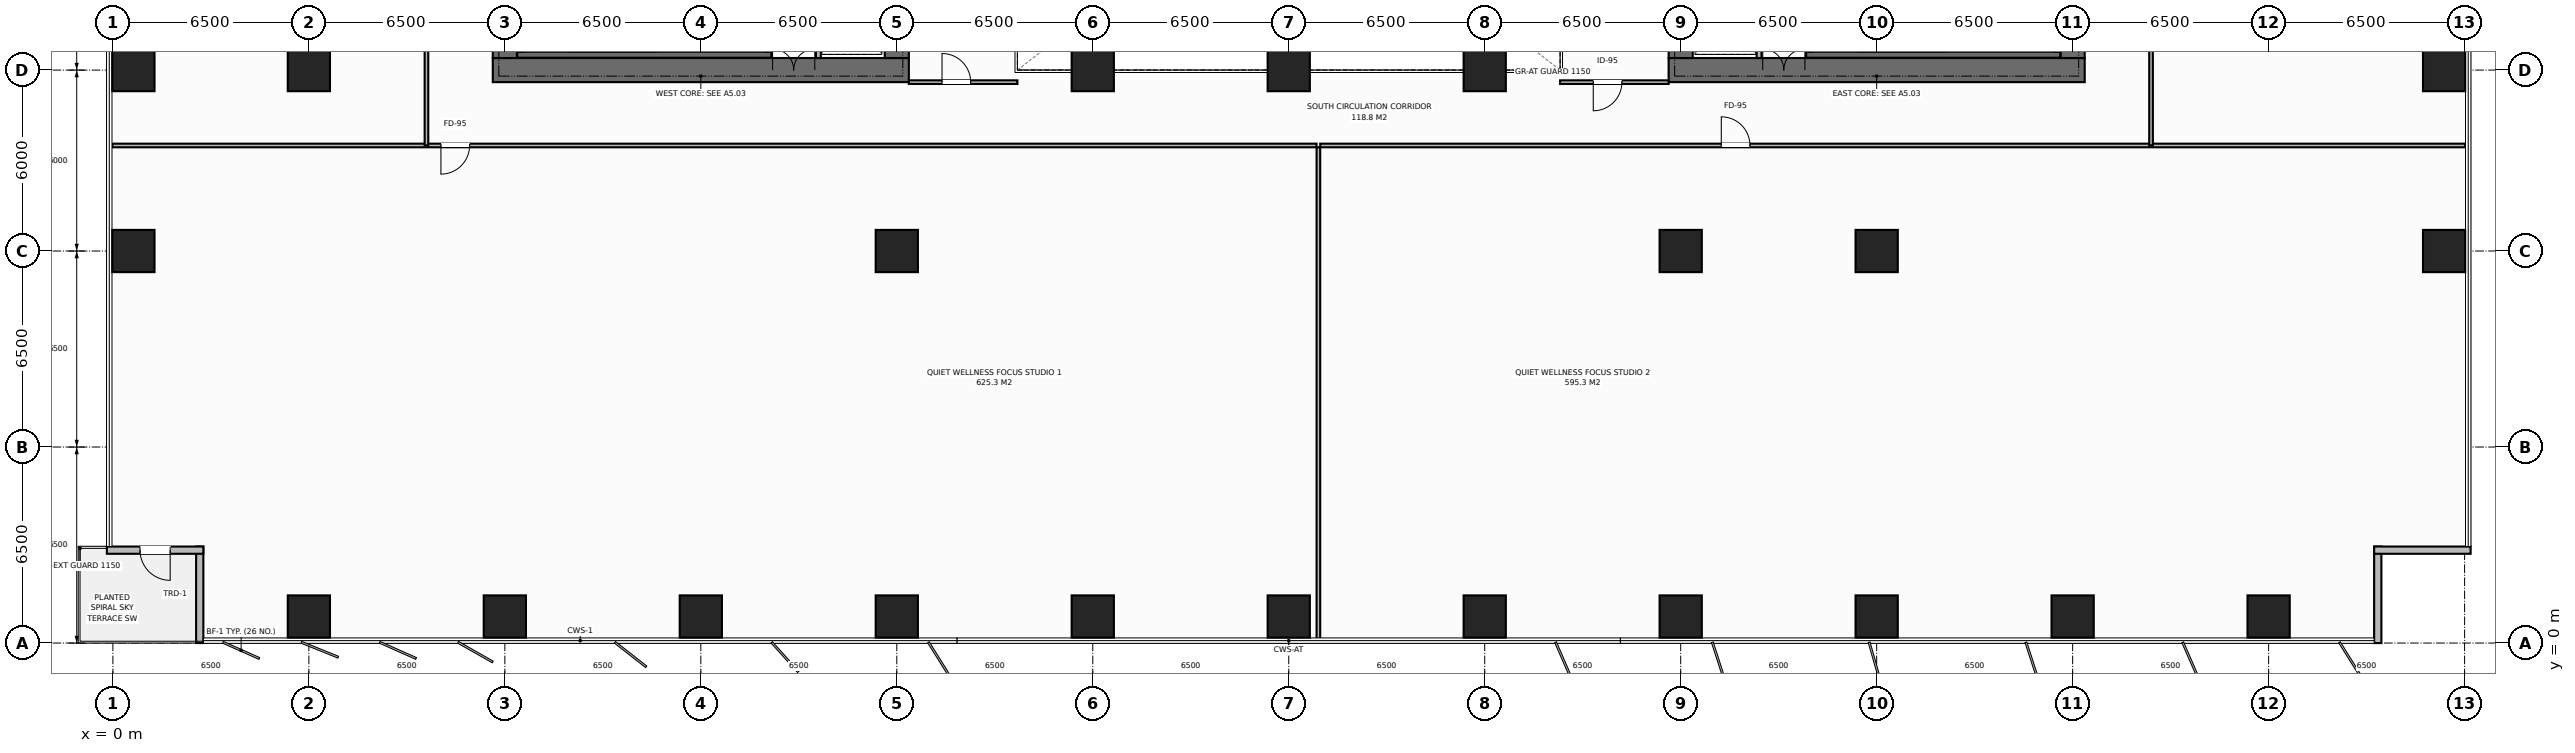
"""IFC4 building model, lengths in metres.
Left out: names, types, materials, properties, quantities, classifications, styles, units other than length and angle.
Written with IfcOpenShell. Run it as: python <this file> out.ifc"""

import sys

from ifc_helpers import new_model, si_unit, direction, frame, frame_2d, origin, origin_2d, place, context, subcontext, project, spatial, rectangle, extrude, element, fill, save


model = new_model("IFC4")
c1 = context("Model", 3, precision=1e-05, world=origin(), true_north=direction((0.0, 1.0)))
c2 = subcontext(c1, "Body", "Model", "MODEL_VIEW")
j1 = project(units=[si_unit("LENGTHUNIT", "METRE"), si_unit("PLANEANGLEUNIT", "RADIAN")], contexts=[c1])
p1 = place(None, origin())
s1 = spatial("IfcSite", under=j1, at=p1, CompositionType="ELEMENT")
p2 = place(p1, origin())
s2 = spatial("IfcBuilding", under=s1, at=p2, CompositionType="ELEMENT")
p3 = place(p2, frame((0.0, 0.0, 27.8)))
s3 = spatial("IfcBuildingStorey", under=s2, at=p3, CompositionType="ELEMENT", Elevation=27.8)
p4 = place(p3, frame((12.6, 19.0, 0.0), z_axis=(0.0, 0.0, 1.0), x_axis=(1.0, 0.0, 0.0)))
e1 = element("IfcWall", 1, at=p4, inside=s3, PredefinedType="SHEAR", context=c2, shape_type="SweptSolid", body=[
    extrude(rectangle(XDim=13.8, YDim=0.8, at=frame_2d((6.9, 0.0))), origin(), (0.0, 0.0, 1.0), 3.8),
])
p5 = place(p4, frame((9.28, 0.0, 0.0)))
e2 = element("IfcOpeningElement", 2, at=p5, cuts=e1, PredefinedType="OPENING", context=c2, shape_type="SweptSolid", body=[
    extrude(rectangle(XDim=1.4, YDim=2.2, at=frame_2d((0.7, 1.1))), frame((0.0, 0.41, 0.0), z_axis=(0.0, -1.0, 0.0), x_axis=(1.0, 0.0, 0.0)), (0.0, 0.0, 1.0), 0.82),
])
p6 = place(p3, frame((13.0, 19.4, 0.0), z_axis=(0.0, 0.0, 1.0), x_axis=(0.0, 1.0, 0.0)))
e3 = element("IfcWall", 3, at=p6, inside=s3, PredefinedType="SHEAR", context=c2, shape_type="SweptSolid", body=[
    extrude(rectangle(XDim=13.2, YDim=0.8, at=frame_2d((6.6, 0.0))), origin(), (0.0, 0.0, 1.0), 3.8),
])
p7 = place(p6, frame((4.65, 0.0, 0.0)))
e4 = element("IfcOpeningElement", 4, at=p7, cuts=e3, PredefinedType="OPENING", context=c2, shape_type="SweptSolid", body=[
    extrude(rectangle(XDim=1.4, YDim=2.2, at=frame_2d((0.7, 1.1))), frame((0.0, 0.41, 0.0), z_axis=(0.0, -1.0, 0.0), x_axis=(1.0, 0.0, 0.0)), (0.0, 0.0, 1.0), 0.82),
])
p8 = place(p3, frame((26.0, 19.4, 0.0), z_axis=(0.0, 0.0, 1.0), x_axis=(0.0, 1.0, 0.0)))
e5 = element("IfcWall", 5, at=p8, inside=s3, PredefinedType="SHEAR", context=c2, shape_type="SweptSolid", body=[
    extrude(rectangle(XDim=13.2, YDim=0.8, at=frame_2d((6.6, 0.0))), origin(), (0.0, 0.0, 1.0), 3.8),
])
p9 = place(p3, frame((51.6, 19.0, 0.0), z_axis=(0.0, 0.0, 1.0), x_axis=(1.0, 0.0, 0.0)))
e6 = element("IfcWall", 6, at=p9, inside=s3, PredefinedType="SHEAR", context=c2, shape_type="SweptSolid", body=[
    extrude(rectangle(XDim=13.8, YDim=0.8, at=frame_2d((6.9, 0.0))), origin(), (0.0, 0.0, 1.0), 3.8),
])
p10 = place(p9, frame((3.12, 0.0, 0.0)))
e7 = element("IfcOpeningElement", 7, at=p10, cuts=e6, PredefinedType="OPENING", context=c2, shape_type="SweptSolid", body=[
    extrude(rectangle(XDim=1.4, YDim=2.2, at=frame_2d((0.7, 1.1))), frame((0.0, 0.41, 0.0), z_axis=(0.0, -1.0, 0.0), x_axis=(1.0, 0.0, 0.0)), (0.0, 0.0, 1.0), 0.82),
])
p11 = place(p3, frame((52.0, 19.4, 0.0), z_axis=(0.0, 0.0, 1.0), x_axis=(0.0, 1.0, 0.0)))
e8 = element("IfcWall", 8, at=p11, inside=s3, PredefinedType="SHEAR", context=c2, shape_type="SweptSolid", body=[
    extrude(rectangle(XDim=13.2, YDim=0.8, at=frame_2d((6.6, 0.0))), origin(), (0.0, 0.0, 1.0), 3.8),
])
p12 = place(p3, frame((65.0, 19.4, 0.0), z_axis=(0.0, 0.0, 1.0), x_axis=(0.0, 1.0, 0.0)))
e9 = element("IfcWall", 9, at=p12, inside=s3, PredefinedType="SHEAR", context=c2, shape_type="SweptSolid", body=[
    extrude(rectangle(XDim=13.2, YDim=0.8, at=frame_2d((6.6, 0.0))), origin(), (0.0, 0.0, 1.0), 3.8),
])
p13 = place(p12, frame((8.05, 0.0, 0.0)))
e10 = element("IfcOpeningElement", 10, at=p13, cuts=e9, PredefinedType="OPENING", context=c2, shape_type="SweptSolid", body=[
    extrude(rectangle(XDim=1.3, YDim=2.2, at=frame_2d((0.65, 1.1))), frame((0.0, 0.41, 0.0), z_axis=(0.0, -1.0, 0.0), x_axis=(1.0, 0.0, 0.0)), (0.0, 0.0, 1.0), 0.82),
])
for number, where, z_axis, x_axis in (
    (11, (13.41, 19.51, 0.0), (0.0, 0.0, 1.0), (1.0, 0.0, 0.0)),
    (12, (56.16, 19.51, 0.0), (0.0, 0.0, 1.0), (1.0, 0.0, 0.0)),
):
    element("IfcWall", number, at=place(p3, frame(where, z_axis=z_axis, x_axis=x_axis)), inside=s3, PredefinedType="SHEAR", context=c2, shape_type="SweptSolid", body=[
        extrude(rectangle(XDim=8.43, YDim=0.2, at=frame_2d((4.215, 0.0))), origin(), (0.0, 0.0, 1.0), 3.8),
    ])
for number, where, z_axis, x_axis in (
    (13, (58.5, 13.0, 0.0), (0.0, 0.0, 1.0), (1.0, 0.0, 0.0)),
    (14, (6.5, 19.0, 0.0), (0.0, 0.0, 1.0), (1.0, 0.0, 0.0)),
    (15, (32.5, 19.0, 0.0), (0.0, 0.0, 1.0), (1.0, 0.0, 0.0)),
    (16, (39.0, 19.0, 0.0), (0.0, 0.0, 1.0), (1.0, 0.0, 0.0)),
    (17, (45.5, 19.0, 0.0), (0.0, 0.0, 1.0), (1.0, 0.0, 0.0)),
    (18, (26.0, 13.0, 0.0), (0.0, 0.0, 1.0), (1.0, 0.0, 0.0)),
    (19, (52.0, 13.0, 0.0), (0.0, 0.0, 1.0), (1.0, 0.0, 0.0)),
    (20, (6.5, 0.88, 0.0), (0.0, 0.0, 1.0), (1.0, 0.0, 0.0)),
    (21, (13.0, 0.88, 0.0), (0.0, 0.0, 1.0), (1.0, 0.0, 0.0)),
    (22, (19.5, 0.88, 0.0), (0.0, 0.0, 1.0), (1.0, 0.0, 0.0)),
    (23, (26.0, 0.88, 0.0), (0.0, 0.0, 1.0), (1.0, 0.0, 0.0)),
    (24, (32.5, 0.88, 0.0), (0.0, 0.0, 1.0), (1.0, 0.0, 0.0)),
    (25, (39.0, 0.88, 0.0), (0.0, 0.0, 1.0), (1.0, 0.0, 0.0)),
    (26, (45.5, 0.88, 0.0), (0.0, 0.0, 1.0), (1.0, 0.0, 0.0)),
    (27, (52.0, 0.88, 0.0), (0.0, 0.0, 1.0), (1.0, 0.0, 0.0)),
    (28, (58.5, 0.88, 0.0), (0.0, 0.0, 1.0), (1.0, 0.0, 0.0)),
    (29, (65.0, 0.88, 0.0), (0.0, 0.0, 1.0), (1.0, 0.0, 0.0)),
    (30, (71.5, 0.88, 0.0), (0.0, 0.0, 1.0), (1.0, 0.0, 0.0)),
    (31, (0.68, 13.0, 0.0), (0.0, 0.0, 1.0), (1.0, 0.0, 0.0)),
    (32, (77.32, 13.0, 0.0), (0.0, 0.0, 1.0), (1.0, 0.0, 0.0)),
    (33, (0.68, 19.0, 0.0), (0.0, 0.0, 1.0), (1.0, 0.0, 0.0)),
    (34, (77.32, 19.0, 0.0), (0.0, 0.0, 1.0), (1.0, 0.0, 0.0)),
):
    element("IfcColumn", number, at=place(p3, frame(where, z_axis=z_axis, x_axis=x_axis)), inside=s3, PredefinedType="COLUMN", context=c2, shape_type="SweptSolid", body=[
        extrude(rectangle(XDim=1.4, YDim=1.4, at=origin_2d()), origin(), (0.0, 0.0, 1.0), 3.8),
    ])
p14 = place(p3, frame((2.88, 0.0, 0.0), z_axis=(0.0, 0.0, 1.0), x_axis=(0.0, 1.0, 0.0)))
e35 = element("IfcWall", 35, at=p14, inside=s3, PredefinedType="STANDARD", context=c2, shape_type="SweptSolid", body=[
    extrude(rectangle(XDim=3.2, YDim=0.24, at=frame_2d((1.6, 0.0))), origin(), (0.0, 0.0, 1.0), 3.55),
])
p15 = place(p3, frame((3.0, 3.08, 0.0), z_axis=(0.0, 0.0, 1.0), x_axis=(-1.0, 0.0, 0.0)))
e36 = element("IfcWall", 36, at=p15, inside=s3, PredefinedType="STANDARD", context=c2, shape_type="SweptSolid", body=[
    extrude(rectangle(XDim=3.2, YDim=0.24, at=frame_2d((1.6, 0.0))), origin(), (0.0, 0.0, 1.0), 3.55),
])
p16 = place(p15, frame((1.1, 0.0, 0.0)))
e37 = element("IfcOpeningElement", 37, at=p16, cuts=e36, PredefinedType="OPENING", context=c2, shape_type="SweptSolid", body=[
    extrude(rectangle(XDim=1.0, YDim=2.2, at=frame_2d((0.5, 1.1))), frame((0.0, 0.13, 0.0), z_axis=(0.0, -1.0, 0.0), x_axis=(1.0, 0.0, 0.0)), (0.0, 0.0, 1.0), 0.26),
])
for number, where, z_axis, x_axis in (
    (38, (75.12, 3.2, 0.0), (0.0, 0.0, 1.0), (0.0, -1.0, 0.0)),
    (39, (78.2, 3.08, 0.0), (0.0, 0.0, 1.0), (-1.0, 0.0, 0.0)),
):
    element("IfcWall", number, at=place(p3, frame(where, z_axis=z_axis, x_axis=x_axis)), inside=s3, PredefinedType="STANDARD", context=c2, shape_type="SweptSolid", body=[
        extrude(rectangle(XDim=3.2, YDim=0.24, at=frame_2d((1.6, 0.0))), origin(), (0.0, 0.0, 1.0), 3.55),
    ])
p17 = place(p3, frame((23.4, 19.4, 0.0), z_axis=(0.0, 0.0, 1.0), x_axis=(0.0, 1.0, 0.0)))
e40 = element("IfcWall", 40, at=p17, inside=s3, PredefinedType="STANDARD", context=c2, shape_type="SweptSolid", body=[
    extrude(rectangle(XDim=13.2, YDim=0.16, at=frame_2d((6.6, 0.0))), origin(), (0.0, 0.0, 1.0), 3.55),
])
p18 = place(p17, frame((0.55, 0.0, 0.0)))
e41 = element("IfcOpeningElement", 41, at=p18, cuts=e40, PredefinedType="OPENING", context=c2, shape_type="SweptSolid", body=[
    extrude(rectangle(XDim=1.1, YDim=2.2, at=frame_2d((0.55, 1.1))), frame((0.0, 0.09, 0.0), z_axis=(0.0, -1.0, 0.0), x_axis=(1.0, 0.0, 0.0)), (0.0, 0.0, 1.0), 0.18),
])
p19 = place(p17, frame((2.7, 0.0, 0.0)))
e42 = element("IfcOpeningElement", 42, at=p19, cuts=e40, PredefinedType="OPENING", context=c2, shape_type="SweptSolid", body=[
    extrude(rectangle(XDim=1.1, YDim=2.2, at=frame_2d((0.55, 1.1))), frame((0.0, 0.09, 0.0), z_axis=(0.0, -1.0, 0.0), x_axis=(1.0, 0.0, 0.0)), (0.0, 0.0, 1.0), 0.18),
])
p20 = place(p3, frame((54.6, 19.4, 0.0), z_axis=(0.0, 0.0, 1.0), x_axis=(0.0, 1.0, 0.0)))
e43 = element("IfcWall", 43, at=p20, inside=s3, PredefinedType="STANDARD", context=c2, shape_type="SweptSolid", body=[
    extrude(rectangle(XDim=13.2, YDim=0.16, at=frame_2d((6.6, 0.0))), origin(), (0.0, 0.0, 1.0), 3.55),
])
p21 = place(p20, frame((0.55, 0.0, 0.0)))
e44 = element("IfcOpeningElement", 44, at=p21, cuts=e43, PredefinedType="OPENING", context=c2, shape_type="SweptSolid", body=[
    extrude(rectangle(XDim=1.1, YDim=2.2, at=frame_2d((0.55, 1.1))), frame((0.0, 0.09, 0.0), z_axis=(0.0, -1.0, 0.0), x_axis=(1.0, 0.0, 0.0)), (0.0, 0.0, 1.0), 0.18),
])
p22 = place(p20, frame((2.7, 0.0, 0.0)))
e45 = element("IfcOpeningElement", 45, at=p22, cuts=e43, PredefinedType="OPENING", context=c2, shape_type="SweptSolid", body=[
    extrude(rectangle(XDim=1.1, YDim=2.2, at=frame_2d((0.55, 1.1))), frame((0.0, 0.09, 0.0), z_axis=(0.0, -1.0, 0.0), x_axis=(1.0, 0.0, 0.0)), (0.0, 0.0, 1.0), 0.18),
])
p23 = place(p3, frame((26.4, 18.6, 0.0), z_axis=(0.0, 0.0, 1.0), x_axis=(1.0, 0.0, 0.0)))
e46 = element("IfcWall", 46, at=p23, inside=s3, PredefinedType="PARTITIONING", context=c2, shape_type="SweptSolid", body=[
    extrude(rectangle(XDim=3.6, YDim=0.12, at=frame_2d((1.8, 0.0))), origin(), (0.0, 0.0, 1.0), 3.55),
])
p24 = place(p23, frame((1.1, 0.0, 0.0)))
e47 = element("IfcOpeningElement", 47, at=p24, cuts=e46, PredefinedType="OPENING", context=c2, shape_type="SweptSolid", body=[
    extrude(rectangle(XDim=0.95, YDim=2.15, at=frame_2d((0.475, 1.075))), frame((0.0, 0.07, 0.0), z_axis=(0.0, -1.0, 0.0), x_axis=(1.0, 0.0, 0.0)), (0.0, 0.0, 1.0), 0.14),
])
p25 = place(p3, frame((48.0, 18.6, 0.0), z_axis=(0.0, 0.0, 1.0), x_axis=(1.0, 0.0, 0.0)))
e48 = element("IfcWall", 48, at=p25, inside=s3, PredefinedType="PARTITIONING", context=c2, shape_type="SweptSolid", body=[
    extrude(rectangle(XDim=3.6, YDim=0.12, at=frame_2d((1.8, 0.0))), origin(), (0.0, 0.0, 1.0), 3.55),
])
p26 = place(p25, frame((1.1, 0.0, 0.0)))
e49 = element("IfcOpeningElement", 49, at=p26, cuts=e48, PredefinedType="OPENING", context=c2, shape_type="SweptSolid", body=[
    extrude(rectangle(XDim=0.95, YDim=2.15, at=frame_2d((0.475, 1.075))), frame((0.0, 0.07, 0.0), z_axis=(0.0, -1.0, 0.0), x_axis=(1.0, 0.0, 0.0)), (0.0, 0.0, 1.0), 0.14),
])
p27 = place(p3, frame((39.983, 0.02, 0.0), z_axis=(0.0, 0.0, 1.0), x_axis=(0.0, 1.0, 0.0)))
e50 = element("IfcWall", 50, at=p27, inside=s3, PredefinedType="PARTITIONING", context=c2, shape_type="SweptSolid", body=[
    extrude(rectangle(XDim=16.42, YDim=0.12, at=frame_2d((8.21, 0.0))), origin(), (0.0, 0.0, 1.0), 3.55),
])
p28 = place(p3, frame((-0.02, 16.5, 0.0), z_axis=(0.0, 0.0, 1.0), x_axis=(1.0, 0.0, 0.0)))
e51 = element("IfcWall", 51, at=p28, inside=s3, PredefinedType="PARTITIONING", context=c2, shape_type="SweptSolid", body=[
    extrude(rectangle(XDim=39.943, YDim=0.12, at=frame_2d((19.972, 0.0))), origin(), (0.0, 0.0, 1.0), 3.55),
])
p29 = place(p28, frame((10.9, 0.0, 0.0)))
e52 = element("IfcOpeningElement", 52, at=p29, cuts=e51, PredefinedType="OPENING", context=c2, shape_type="SweptSolid", body=[
    extrude(rectangle(XDim=0.95, YDim=2.15, at=frame_2d((0.475, 1.075))), frame((0.0, 0.07, 0.0), z_axis=(0.0, -1.0, 0.0), x_axis=(1.0, 0.0, 0.0)), (0.0, 0.0, 1.0), 0.14),
])
p30 = place(p3, frame((40.043, 16.5, 0.0), z_axis=(0.0, 0.0, 1.0), x_axis=(1.0, 0.0, 0.0)))
e53 = element("IfcWall", 53, at=p30, inside=s3, PredefinedType="PARTITIONING", context=c2, shape_type="SweptSolid", body=[
    extrude(rectangle(XDim=37.977, YDim=0.12, at=frame_2d((18.988, 0.0))), origin(), (0.0, 0.0, 1.0), 3.55),
])
p31 = place(p30, frame((13.303, 0.0, 0.0)))
e54 = element("IfcOpeningElement", 54, at=p31, cuts=e53, PredefinedType="OPENING", context=c2, shape_type="SweptSolid", body=[
    extrude(rectangle(XDim=0.95, YDim=2.15, at=frame_2d((0.475, 1.075))), frame((0.0, 0.07, 0.0), z_axis=(0.0, -1.0, 0.0), x_axis=(1.0, 0.0, 0.0)), (0.0, 0.0, 1.0), 0.14),
])
p32 = place(p3, frame((10.4, 16.5, 0.0), z_axis=(0.0, 0.0, 1.0), x_axis=(0.0, 1.0, 0.0)))
e55 = element("IfcWall", 55, at=p32, inside=s3, PredefinedType="PARTITIONING", context=c2, shape_type="SweptSolid", body=[
    extrude(rectangle(XDim=19.0, YDim=0.12, at=frame_2d((9.5, 0.0))), origin(), (0.0, 0.0, 1.0), 3.55),
])
p33 = place(p32, frame((9.025, 0.0, 0.0)))
e56 = element("IfcOpeningElement", 56, at=p33, cuts=e55, PredefinedType="OPENING", context=c2, shape_type="SweptSolid", body=[
    extrude(rectangle(XDim=0.95, YDim=2.15, at=frame_2d((0.475, 1.075))), frame((0.0, 0.07, 0.0), z_axis=(0.0, -1.0, 0.0), x_axis=(1.0, 0.0, 0.0)), (0.0, 0.0, 1.0), 0.14),
])
p34 = place(p3, frame((67.6, 16.5, 0.0), z_axis=(0.0, 0.0, 1.0), x_axis=(0.0, 1.0, 0.0)))
e57 = element("IfcWall", 57, at=p34, inside=s3, PredefinedType="PARTITIONING", context=c2, shape_type="SweptSolid", body=[
    extrude(rectangle(XDim=9.5, YDim=0.12, at=frame_2d((4.75, 0.0))), origin(), (0.0, 0.0, 1.0), 3.55),
])
p35 = place(p34, frame((5.325, 0.0, 0.0)))
e58 = element("IfcOpeningElement", 58, at=p35, cuts=e57, PredefinedType="OPENING", context=c2, shape_type="SweptSolid", body=[
    extrude(rectangle(XDim=0.95, YDim=2.15, at=frame_2d((0.475, 1.075))), frame((0.0, 0.07, 0.0), z_axis=(0.0, -1.0, 0.0), x_axis=(1.0, 0.0, 0.0)), (0.0, 0.0, 1.0), 0.14),
])
p36 = place(p16, origin())
e59 = element("IfcDoor", 59, at=p36, inside=s3, OperationType="SINGLE_SWING_LEFT", PredefinedType="DOOR", context=c2, shape_type="SweptSolid", body=[
    extrude(rectangle(XDim=1.0, YDim=2.2, at=frame_2d((0.5, 1.1))), frame((0.0, 0.025, 0.0), z_axis=(0.0, -1.0, 0.0), x_axis=(1.0, 0.0, 0.0)), (0.0, 0.0, 1.0), 0.05),
])
fill(e37, e59)
p37 = place(p5, origin())
e60 = element("IfcDoor", 60, at=p37, inside=s3, OperationType="DOUBLE_DOOR_SINGLE_SWING", PredefinedType="DOOR", context=c2, shape_type="SweptSolid", body=[
    extrude(rectangle(XDim=1.4, YDim=2.2, at=frame_2d((0.7, 1.1))), frame((0.0, 0.125, 0.0), z_axis=(0.0, -1.0, 0.0), x_axis=(1.0, 0.0, 0.0)), (0.0, 0.0, 1.0), 0.05),
])
fill(e2, e60)
p38 = place(p10, origin())
e61 = element("IfcDoor", 61, at=p38, inside=s3, OperationType="DOUBLE_DOOR_SINGLE_SWING", PredefinedType="DOOR", context=c2, shape_type="SweptSolid", body=[
    extrude(rectangle(XDim=1.4, YDim=2.2, at=frame_2d((0.7, 1.1))), frame((0.0, 0.125, 0.0), z_axis=(0.0, -1.0, 0.0), x_axis=(1.0, 0.0, 0.0)), (0.0, 0.0, 1.0), 0.05),
])
fill(e7, e61)
p39 = place(p24, origin())
e62 = element("IfcDoor", 62, at=p39, inside=s3, OperationType="SINGLE_SWING_LEFT", PredefinedType="DOOR", context=c2, shape_type="SweptSolid", body=[
    extrude(rectangle(XDim=0.95, YDim=2.15, at=frame_2d((0.475, 1.075))), frame((0.0, 0.025, 0.0), z_axis=(0.0, -1.0, 0.0), x_axis=(1.0, 0.0, 0.0)), (0.0, 0.0, 1.0), 0.05),
])
fill(e47, e62)
p40 = place(p26, origin())
e63 = element("IfcDoor", 63, at=p40, inside=s3, OperationType="SINGLE_SWING_RIGHT", PredefinedType="DOOR", context=c2, shape_type="SweptSolid", body=[
    extrude(rectangle(XDim=0.95, YDim=2.15, at=frame_2d((0.475, 1.075))), frame((0.0, 0.025, 0.0), z_axis=(0.0, -1.0, 0.0), x_axis=(1.0, 0.0, 0.0)), (0.0, 0.0, 1.0), 0.05),
])
fill(e49, e63)
p41 = place(p29, origin())
e64 = element("IfcDoor", 64, at=p41, inside=s3, OperationType="SINGLE_SWING_RIGHT", PredefinedType="DOOR", context=c2, shape_type="SweptSolid", body=[
    extrude(rectangle(XDim=0.95, YDim=2.15, at=frame_2d((0.475, 1.075))), frame((0.0, 0.025, 0.0), z_axis=(0.0, -1.0, 0.0), x_axis=(1.0, 0.0, 0.0)), (0.0, 0.0, 1.0), 0.05),
])
fill(e52, e64)
p42 = place(p31, origin())
e65 = element("IfcDoor", 65, at=p42, inside=s3, OperationType="SINGLE_SWING_LEFT", PredefinedType="DOOR", context=c2, shape_type="SweptSolid", body=[
    extrude(rectangle(XDim=0.95, YDim=2.15, at=frame_2d((0.475, 1.075))), frame((0.0, 0.025, 0.0), z_axis=(0.0, -1.0, 0.0), x_axis=(1.0, 0.0, 0.0)), (0.0, 0.0, 1.0), 0.05),
])
fill(e54, e65)
save(model, sys.argv[1])
